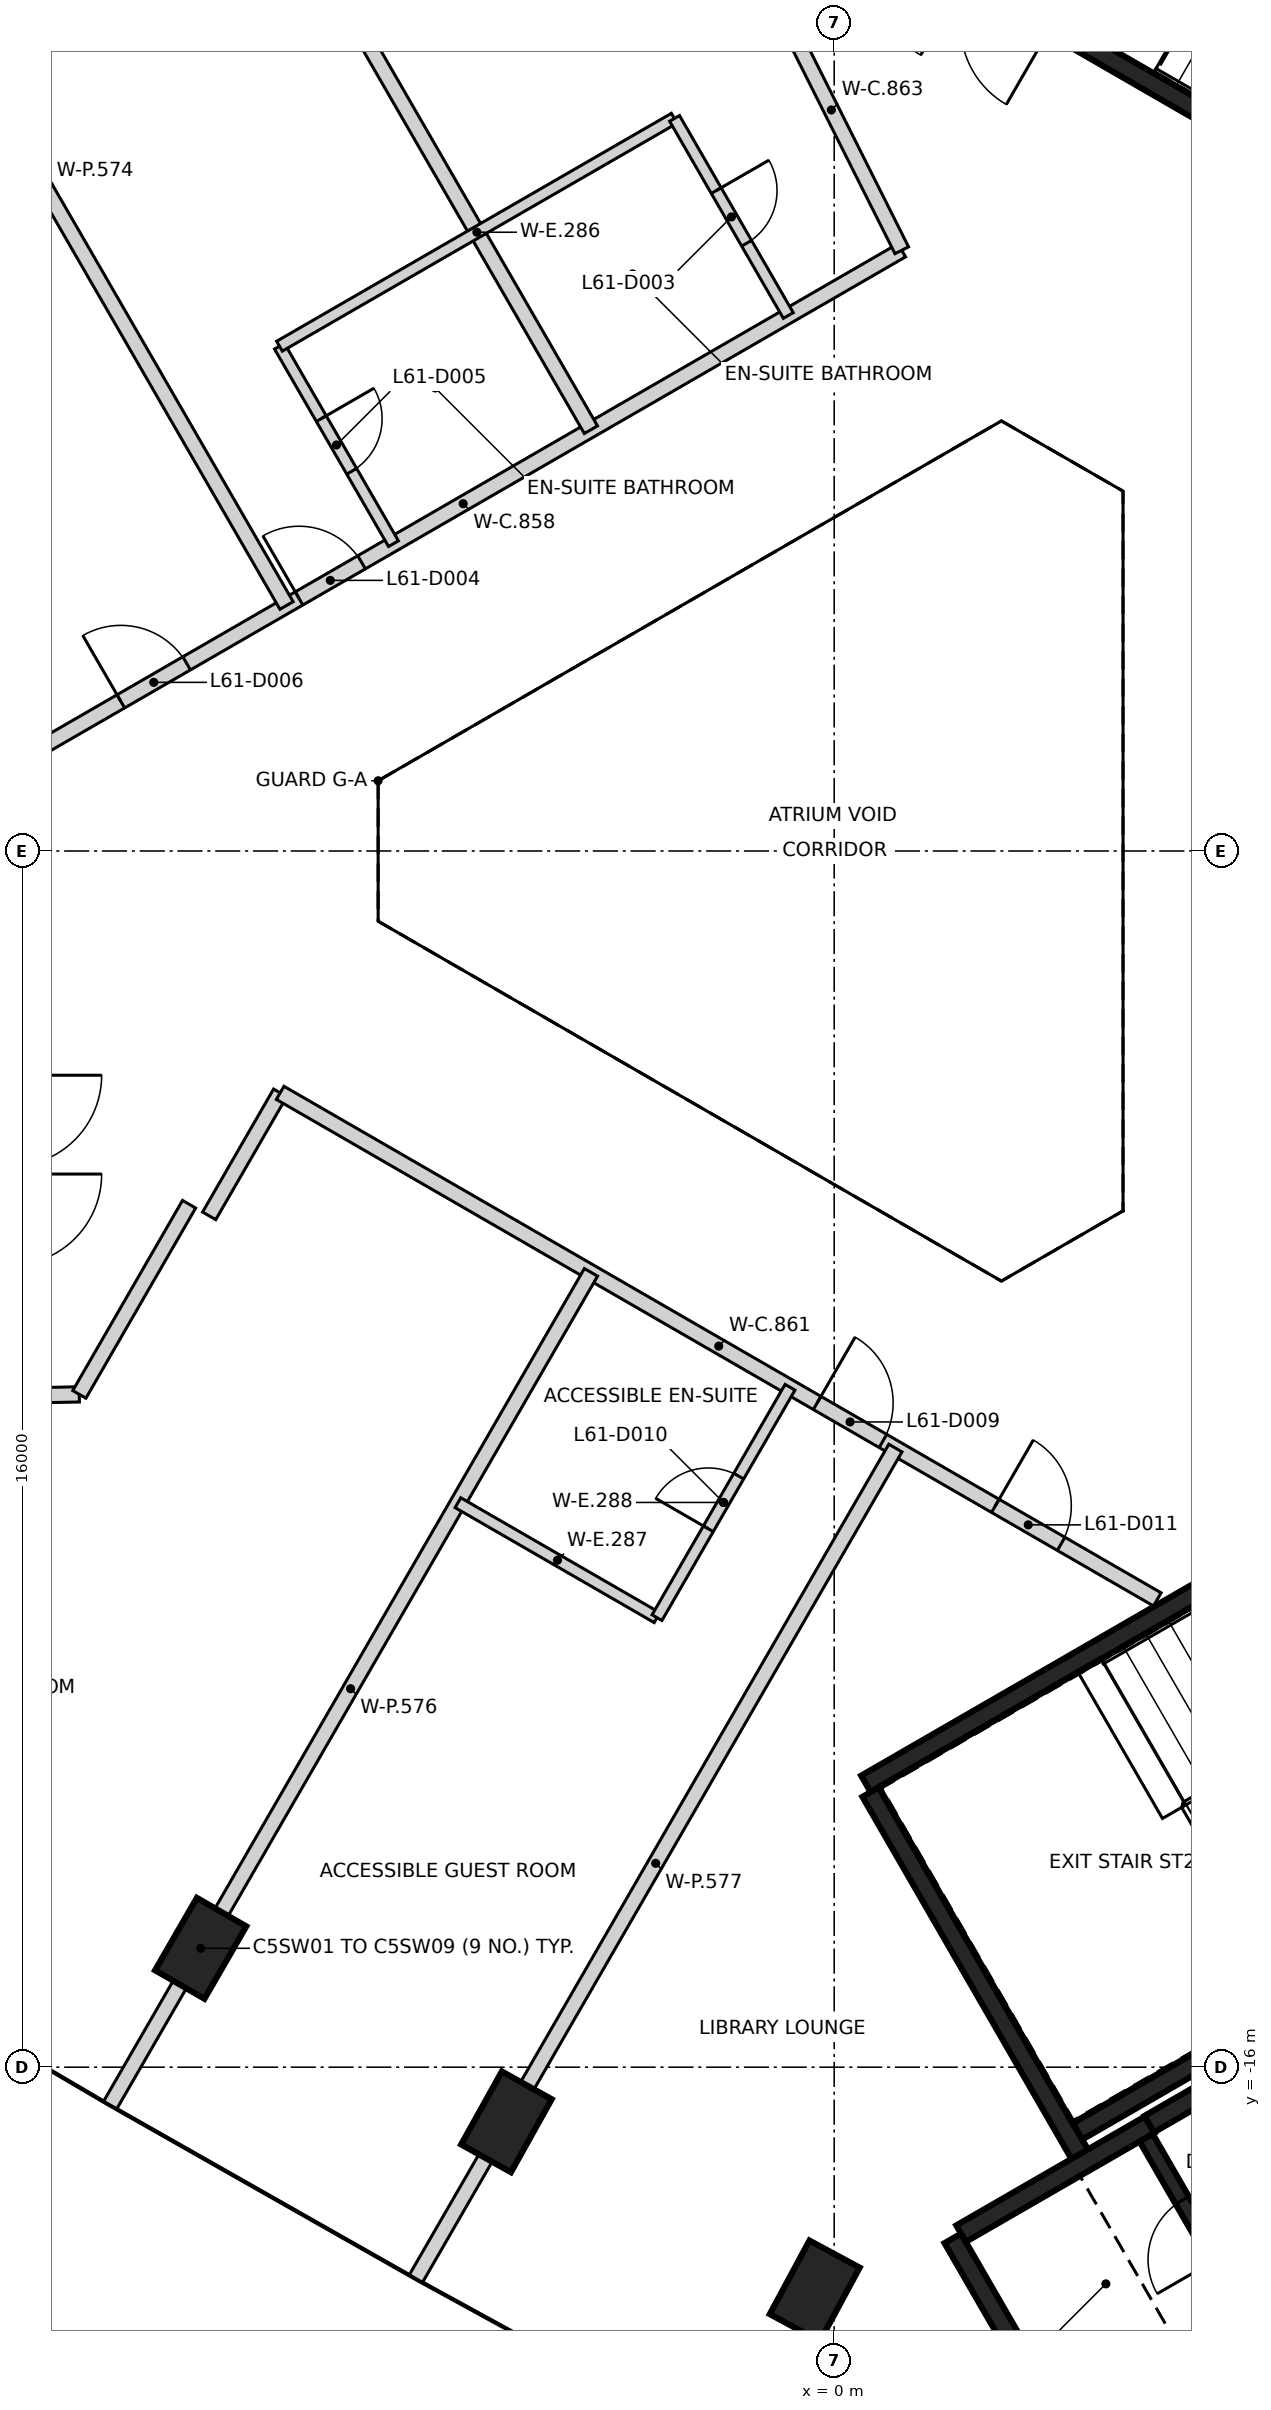
"""IFC4 building model, lengths in metres.
Left out: names, types, materials, properties, quantities, classifications, styles, units other than length and angle.
Written with IfcOpenShell. Run it as: python <this file> out.ifc"""

import sys

from ifc_helpers import new_model, si_unit, direction, frame, frame_2d, origin, origin_2d, place, context, subcontext, project, spatial, rectangle, extrude, element, fill, save


model = new_model("IFC4")
c1 = context("Model", 3, precision=1e-05, world=origin(), true_north=direction((0.0, 1.0)))
c2 = subcontext(c1, "Body", "Model", "MODEL_VIEW")
j1 = project(units=[si_unit("LENGTHUNIT", "METRE"), si_unit("PLANEANGLEUNIT", "RADIAN")], contexts=[c1])
p1 = place(None, origin())
s1 = spatial("IfcSite", under=j1, at=p1, CompositionType="ELEMENT")
p2 = place(p1, origin())
s2 = spatial("IfcBuilding", under=s1, at=p2, CompositionType="ELEMENT")
p3 = place(p2, frame((0.0, 0.0, 243.0)))
s3 = spatial("IfcBuildingStorey", under=s2, at=p3, CompositionType="ELEMENT", Elevation=243.0)
for number, where, z_axis, x_axis in (
    (1, (-8.335, -14.436, -0.35), (0.0, 0.0, 1.0), (0.5, 0.866, 0.0)),
    (2, (-4.312, -16.719, -0.35), (0.0, 0.0, 1.0), (0.487, 0.873, 0.0)),
    (3, (-0.256, -18.943, -0.35), (0.0, 0.0, 1.0), (0.475, 0.88, 0.0)),
):
    element("IfcColumn", number, at=place(p3, frame(where, z_axis=z_axis, x_axis=x_axis)), inside=s3, PredefinedType="COLUMN", context=c2, shape_type="SweptSolid", body=[
        extrude(rectangle(XDim=1.1, YDim=0.75, at=origin_2d()), origin(), (0.0, 0.0, 1.0), 3.6),
    ])
p4 = place(p3, frame((10.42, 6.498, 0.0), z_axis=(0.0, 0.0, 1.0), x_axis=(-0.866021906294, 0.500006057782, 0.0)))
e4 = element("IfcWall", 4, at=p4, inside=s3, PredefinedType="SHEAR", context=c2, shape_type="SweptSolid", body=[
    extrude(rectangle(XDim=11.55, YDim=0.25, at=frame_2d((5.775, 0.0))), origin(), (0.0, 0.0, 1.0), 3.25),
])
p5 = place(p4, frame((10.025, 0.0, 0.0)))
e5 = element("IfcOpeningElement", 5, at=p5, cuts=e4, PredefinedType="OPENING", context=c2, shape_type="SweptSolid", body=[
    extrude(rectangle(XDim=1.2, YDim=2.1, at=frame_2d((0.6, 1.05))), frame((0.0, 0.135, 0.0), z_axis=(0.0, -1.0, 0.0), x_axis=(1.0, 0.0, 0.0)), (0.0, 0.0, 1.0), 0.27),
])
p6 = place(p4, frame((8.725, 0.0, 0.0)))
e6 = element("IfcOpeningElement", 6, at=p6, cuts=e4, PredefinedType="OPENING", context=c2, shape_type="SweptSolid", body=[
    extrude(rectangle(XDim=1.2, YDim=2.1, at=frame_2d((0.6, 1.05))), frame((0.0, 0.135, 0.0), z_axis=(0.0, -1.0, 0.0), x_axis=(1.0, 0.0, 0.0)), (0.0, 0.0, 1.0), 0.27),
])
p7 = place(p3, frame((0.417, -12.273, 0.0), z_axis=(0.0, 0.0, 1.0), x_axis=(0.866021906294, 0.500006057782, 0.0)))
e7 = element("IfcWall", 7, at=p7, inside=s3, PredefinedType="SHEAR", context=c2, shape_type="SweptSolid", body=[
    extrude(rectangle(XDim=11.55, YDim=0.25, at=frame_2d((5.775, 0.0))), origin(), (0.0, 0.0, 1.0), 3.25),
])
p8 = place(p7, frame((10.025, 0.0, 0.0)))
e8 = element("IfcOpeningElement", 8, at=p8, cuts=e7, PredefinedType="OPENING", context=c2, shape_type="SweptSolid", body=[
    extrude(rectangle(XDim=1.2, YDim=2.1, at=frame_2d((0.6, 1.05))), frame((0.0, 0.135, 0.0), z_axis=(0.0, -1.0, 0.0), x_axis=(1.0, 0.0, 0.0)), (0.0, 0.0, 1.0), 0.27),
])
p9 = place(p7, frame((8.725, 0.0, 0.0)))
e9 = element("IfcOpeningElement", 9, at=p9, cuts=e7, PredefinedType="OPENING", context=c2, shape_type="SweptSolid", body=[
    extrude(rectangle(XDim=1.2, YDim=2.1, at=frame_2d((0.6, 1.05))), frame((0.0, 0.135, 0.0), z_axis=(0.0, -1.0, 0.0), x_axis=(1.0, 0.0, 0.0)), (0.0, 0.0, 1.0), 0.27),
])
p10 = place(p3, frame((3.235, -17.153, 0.0), z_axis=(0.0, 0.0, 1.0), x_axis=(-0.500008851346, 0.866020293397, 0.0)))
e10 = element("IfcWall", 10, at=p10, inside=s3, PredefinedType="SHEAR", context=c2, shape_type="SweptSolid", body=[
    extrude(rectangle(XDim=5.51, YDim=0.25, at=frame_2d((2.755, 0.0))), origin(), (0.0, 0.0, 1.0), 3.25),
])
p11 = place(p3, frame((3.217, -21.122, 0.0), z_axis=(0.0, 0.0, 1.0), x_axis=(-0.499998874531, 0.866026053573, 0.0)))
e11 = element("IfcWall", 11, at=p11, inside=s3, PredefinedType="SHEAR", context=c2, shape_type="SweptSolid", body=[
    extrude(rectangle(XDim=3.313, YDim=0.25, at=frame_2d((1.656, 0.0))), origin(), (0.0, 0.0, 1.0), 3.25),
])
p12 = place(p3, frame((1.669, -18.19, 0.0), z_axis=(0.0, 0.0, 1.0), x_axis=(0.866042235819, 0.499970844928, 0.0)))
e12 = element("IfcWall", 12, at=p12, inside=s3, PredefinedType="SHEAR", context=c2, shape_type="SweptSolid", body=[
    extrude(rectangle(XDim=2.865, YDim=0.25, at=frame_2d((1.432, 0.0))), origin(), (0.0, 0.0, 1.0), 3.25),
])
p13 = place(p3, frame((5.675, -19.399, 0.0), z_axis=(0.0, 0.0, 1.0), x_axis=(-0.866026637627, -0.499997862916, 0.0)))
e13 = element("IfcWall", 13, at=p13, inside=s3, PredefinedType="SHEAR", context=c2, shape_type="SweptSolid", body=[
    extrude(rectangle(XDim=2.865, YDim=0.25, at=frame_2d((1.432, 0.0))), origin(), (0.0, 0.0, 1.0), 3.25),
])
p14 = place(p3, frame((5.431, -15.556, 0.0), z_axis=(0.0, 0.0, 1.0), x_axis=(-0.866022940537, -0.500004266446, 0.0)))
e14 = element("IfcWall", 14, at=p14, inside=s3, PredefinedType="SHEAR", context=c2, shape_type="SweptSolid", body=[
    extrude(rectangle(XDim=2.575, YDim=0.25, at=frame_2d((1.287, 0.0))), origin(), (0.0, 0.0, 1.0), 3.25),
])
p15 = place(p3, frame((4.145, -16.749, 0.0), z_axis=(0.0, 0.0, 1.0), x_axis=(0.866038183914, 0.499977863513, 0.0)))
e15 = element("IfcWall", 15, at=p15, inside=s3, PredefinedType="SHEAR", context=c2, shape_type="SweptSolid", body=[
    extrude(rectangle(XDim=1.71, YDim=0.25, at=frame_2d((0.855, 0.0))), origin(), (0.0, 0.0, 1.0), 3.25),
])
p16 = place(p3, frame((5.503, -19.352, 0.0), z_axis=(0.0, 0.0, 1.0), x_axis=(-0.499986818241, 0.866033014143, 0.0)))
e16 = element("IfcWall", 16, at=p16, inside=s3, PredefinedType="SHEAR", context=c2, shape_type="SweptSolid", body=[
    extrude(rectangle(XDim=2.798, YDim=0.2, at=frame_2d((1.399, 0.0))), origin(), (0.0, 0.0, 1.0), 3.25),
])
p17 = place(p16, frame((0.949, 0.0, 0.0)))
e17 = element("IfcOpeningElement", 17, at=p17, cuts=e16, PredefinedType="OPENING", context=c2, shape_type="SweptSolid", body=[
    extrude(rectangle(XDim=0.9, YDim=2.1, at=frame_2d((0.45, 1.05))), frame((0.0, 0.11, 0.0), z_axis=(0.0, -1.0, 0.0), x_axis=(1.0, 0.0, 0.0)), (0.0, 0.0, 1.0), 0.22),
])
p18 = place(p3, frame((-19.149, -7.329, 0.0), z_axis=(0.0, 0.0, 1.0), x_axis=(0.999808990333, 0.019544381503, 0.0)))
e18 = element("IfcWall", 18, at=p18, inside=s3, PredefinedType="PARTITIONING", context=c2, shape_type="SweptSolid", body=[
    extrude(rectangle(XDim=9.219, YDim=0.2, at=frame_2d((4.609, 0.0))), origin(), (0.0, 0.0, 1.0), 3.25),
])
p19 = place(p18, frame((1.649, 0.0, 0.0)))
e19 = element("IfcOpeningElement", 19, at=p19, cuts=e18, PredefinedType="OPENING", context=c2, shape_type="SweptSolid", body=[
    extrude(rectangle(XDim=1.0, YDim=2.1, at=frame_2d((0.5, 1.05))), frame((0.0, 0.11, 0.0), z_axis=(0.0, -1.0, 0.0), x_axis=(1.0, 0.0, 0.0)), (0.0, 0.0, 1.0), 0.22),
])
p20 = place(p18, frame((6.245, 0.0, 0.0)))
e20 = element("IfcOpeningElement", 20, at=p20, cuts=e18, PredefinedType="OPENING", context=c2, shape_type="SweptSolid", body=[
    extrude(rectangle(XDim=1.0, YDim=2.1, at=frame_2d((0.5, 1.05))), frame((0.0, 0.11, 0.0), z_axis=(0.0, -1.0, 0.0), x_axis=(1.0, 0.0, 0.0)), (0.0, 0.0, 1.0), 0.22),
])
p21 = place(p3, frame((-10.652, 1.237, 0.0), z_axis=(0.0, 0.0, 1.0), x_axis=(0.865922902183, 0.50017749597, 0.0)))
e21 = element("IfcWall", 21, at=p21, inside=s3, PredefinedType="PARTITIONING", context=c2, shape_type="SweptSolid", body=[
    extrude(rectangle(XDim=13.328, YDim=0.2, at=frame_2d((6.664, 0.0))), origin(), (0.0, 0.0, 1.0), 3.25),
])
p22 = place(p21, frame((4.171, 0.0, 0.0)))
e22 = element("IfcOpeningElement", 22, at=p22, cuts=e21, PredefinedType="OPENING", context=c2, shape_type="SweptSolid", body=[
    extrude(rectangle(XDim=0.95, YDim=2.1, at=frame_2d((0.475, 1.05))), frame((0.0, 0.11, 0.0), z_axis=(0.0, -1.0, 0.0), x_axis=(1.0, 0.0, 0.0)), (0.0, 0.0, 1.0), 0.22),
])
p23 = place(p21, frame((1.463, 0.0, 0.0)))
e23 = element("IfcOpeningElement", 23, at=p23, cuts=e21, PredefinedType="OPENING", context=c2, shape_type="SweptSolid", body=[
    extrude(rectangle(XDim=1.0, YDim=2.1, at=frame_2d((0.5, 1.05))), frame((0.0, 0.11, 0.0), z_axis=(0.0, -1.0, 0.0), x_axis=(1.0, 0.0, 0.0)), (0.0, 0.0, 1.0), 0.22),
])
p24 = place(p3, frame((-9.931, -7.149, 0.0), z_axis=(0.0, 0.0, 1.0), x_axis=(0.499829760107, 0.866123669525, 0.0)))
e24 = element("IfcWall", 24, at=p24, inside=s3, PredefinedType="PARTITIONING", context=c2, shape_type="SweptSolid", body=[
    extrude(rectangle(XDim=2.889, YDim=0.2, at=frame_2d((1.444, 0.0))), origin(), (0.0, 0.0, 1.0), 3.25),
])
p25 = place(p3, frame((-8.223, -4.8, 0.0), z_axis=(0.0, 0.0, 1.0), x_axis=(0.499835576036, 0.866120313195, 0.0)))
e25 = element("IfcWall", 25, at=p25, inside=s3, PredefinedType="PARTITIONING", context=c2, shape_type="SweptSolid", body=[
    extrude(rectangle(XDim=1.868, YDim=0.2, at=frame_2d((0.934, 0.0))), origin(), (0.0, 0.0, 1.0), 3.25),
])
p26 = place(p3, frame((-7.289, -3.182, 0.0), z_axis=(0.0, 0.0, 1.0), x_axis=(0.865979329032, -0.500079795322, 0.0)))
e26 = element("IfcWall", 26, at=p26, inside=s3, PredefinedType="PARTITIONING", context=c2, shape_type="SweptSolid", body=[
    extrude(rectangle(XDim=13.326, YDim=0.2, at=frame_2d((6.663, 0.0))), origin(), (0.0, 0.0, 1.0), 3.25),
])
p27 = place(p26, frame((8.158, 0.0, 0.0)))
e27 = element("IfcOpeningElement", 27, at=p27, cuts=e26, PredefinedType="OPENING", context=c2, shape_type="SweptSolid", body=[
    extrude(rectangle(XDim=1.0, YDim=2.1, at=frame_2d((0.5, 1.05))), frame((0.0, 0.11, 0.0), z_axis=(0.0, -1.0, 0.0), x_axis=(1.0, 0.0, 0.0)), (0.0, 0.0, 1.0), 0.22),
])
p28 = place(p26, frame((10.865, 0.0, 0.0)))
e28 = element("IfcOpeningElement", 28, at=p28, cuts=e26, PredefinedType="OPENING", context=c2, shape_type="SweptSolid", body=[
    extrude(rectangle(XDim=1.0, YDim=2.1, at=frame_2d((0.5, 1.05))), frame((0.0, 0.11, 0.0), z_axis=(0.0, -1.0, 0.0), x_axis=(1.0, 0.0, 0.0)), (0.0, 0.0, 1.0), 0.22),
])
p29 = place(p3, frame((-0.964, 11.595, 0.0), z_axis=(0.0, 0.0, 1.0), x_axis=(0.448584236569, -0.893740556706, 0.0)))
e29 = element("IfcWall", 29, at=p29, inside=s3, PredefinedType="PARTITIONING", context=c2, shape_type="SweptSolid", body=[
    extrude(rectangle(XDim=4.131, YDim=0.2, at=frame_2d((2.065, 0.0))), origin(), (0.0, 0.0, 1.0), 3.25),
])
p30 = place(p3, frame((-13.513, 14.156, 0.0), z_axis=(0.0, 0.0, 1.0), x_axis=(0.500012240511, -0.866018336607, 0.0)))
e30 = element("IfcWall", 30, at=p30, inside=s3, PredefinedType="PARTITIONING", context=c2, shape_type="SweptSolid", body=[
    extrude(rectangle(XDim=12.616, YDim=0.2, at=frame_2d((6.308, 0.0))), origin(), (0.0, 0.0, 1.0), 3.25),
])
for number, where, z_axis, x_axis in (
    (31, (-9.525, 16.498, 0.0), (0.0, 0.0, 1.0), (0.5, -0.866, 0.0)),
    (32, (-9.525, -16.498, 0.0), (0.0, 0.0, 1.0), (0.5, 0.866, 0.0)),
):
    element("IfcWall", number, at=place(p3, frame(where, z_axis=z_axis, x_axis=x_axis)), inside=s3, PredefinedType="PARTITIONING", context=c2, shape_type="SweptSolid", body=[
        extrude(rectangle(XDim=12.65, YDim=0.2, at=frame_2d((6.325, 0.0))), origin(), (0.0, 0.0, 1.0), 3.25),
    ])
p31 = place(p3, frame((-5.503, -18.781, 0.0), z_axis=(0.0, 0.0, 1.0), x_axis=(0.499968699423, 0.866043474427, 0.0)))
e33 = element("IfcWall", 33, at=p31, inside=s3, PredefinedType="PARTITIONING", context=c2, shape_type="SweptSolid", body=[
    extrude(rectangle(XDim=12.616, YDim=0.2, at=frame_2d((6.308, 0.0))), origin(), (0.0, 0.0, 1.0), 3.25),
])
p32 = place(p3, frame((-7.298, 6.641, 0.0), z_axis=(0.0, 0.0, 1.0), x_axis=(0.499990139034, -0.866031096941, 0.0)))
e34 = element("IfcWall", 34, at=p32, inside=s3, PredefinedType="PARTITIONING", context=c2, shape_type="SweptSolid", body=[
    extrude(rectangle(XDim=3.0, YDim=0.15, at=frame_2d((1.5, 0.0))), origin(), (0.0, 0.0, 1.0), 3.25),
])
p33 = place(p32, frame((1.1, 0.0, 0.0)))
e35 = element("IfcOpeningElement", 35, at=p33, cuts=e34, PredefinedType="OPENING", context=c2, shape_type="SweptSolid", body=[
    extrude(rectangle(XDim=0.8, YDim=2.1, at=frame_2d((0.4, 1.05))), frame((0.0, 0.085, 0.0), z_axis=(0.0, -1.0, 0.0), x_axis=(1.0, 0.0, 0.0)), (0.0, 0.0, 1.0), 0.17),
])
p34 = place(p3, frame((-7.298, 6.641, 0.0), z_axis=(0.0, 0.0, 1.0), x_axis=(0.865999837459, 0.50004427956, 0.0)))
e36 = element("IfcWall", 36, at=p34, inside=s3, PredefinedType="PARTITIONING", context=c2, shape_type="SweptSolid", body=[
    extrude(rectangle(XDim=5.998, YDim=0.15, at=frame_2d((2.999, 0.0))), origin(), (0.0, 0.0, 1.0), 3.25),
])
p35 = place(p3, frame((-4.95, -8.574, 0.0), z_axis=(0.0, 0.0, 1.0), x_axis=(0.866033665757, -0.499985689571, 0.0)))
e37 = element("IfcWall", 37, at=p35, inside=s3, PredefinedType="PARTITIONING", context=c2, shape_type="SweptSolid", body=[
    extrude(rectangle(XDim=3.024, YDim=0.15, at=frame_2d((1.512, 0.0))), origin(), (0.0, 0.0, 1.0), 3.25),
])
p36 = place(p3, frame((-2.331, -10.086, 0.0), z_axis=(0.0, 0.0, 1.0), x_axis=(0.500010275428, 0.866019471182, 0.0)))
e38 = element("IfcWall", 38, at=p36, inside=s3, PredefinedType="PARTITIONING", context=c2, shape_type="SweptSolid", body=[
    extrude(rectangle(XDim=3.5, YDim=0.15, at=frame_2d((1.75, 0.0))), origin(), (0.0, 0.0, 1.0), 3.25),
])
p37 = place(p36, frame((1.35, 0.0, 0.0)))
e39 = element("IfcOpeningElement", 39, at=p37, cuts=e38, PredefinedType="OPENING", context=c2, shape_type="SweptSolid", body=[
    extrude(rectangle(XDim=0.8, YDim=2.1, at=frame_2d((0.4, 1.05))), frame((0.0, 0.085, 0.0), z_axis=(0.0, -1.0, 0.0), x_axis=(1.0, 0.0, 0.0)), (0.0, 0.0, 1.0), 0.17),
])
p38 = place(p3, frame((-2.1, 9.638, 0.0), z_axis=(0.0, 0.0, 1.0), x_axis=(0.499753046638, -0.866167935435, 0.0)))
e40 = element("IfcWall", 40, at=p38, inside=s3, PredefinedType="PARTITIONING", context=c2, shape_type="SweptSolid", body=[
    extrude(rectangle(XDim=2.994, YDim=0.15, at=frame_2d((1.497, 0.0))), origin(), (0.0, 0.0, 1.0), 3.25),
])
p39 = place(p38, frame((1.096, 0.0, 0.0)))
e41 = element("IfcOpeningElement", 41, at=p39, cuts=e40, PredefinedType="OPENING", context=c2, shape_type="SweptSolid", body=[
    extrude(rectangle(XDim=0.8, YDim=2.1, at=frame_2d((0.4, 1.05))), frame((0.0, 0.085, 0.0), z_axis=(0.0, -1.0, 0.0), x_axis=(1.0, 0.0, 0.0)), (0.0, 0.0, 1.0), 0.17),
])
p40 = place(p17, origin())
e42 = element("IfcDoor", 42, at=p40, inside=s3, OperationType="SINGLE_SWING_RIGHT", PredefinedType="DOOR", context=c2, shape_type="SweptSolid", body=[
    extrude(rectangle(XDim=0.9, YDim=2.1, at=frame_2d((0.45, 1.05))), frame((0.0, 0.025, 0.0), z_axis=(0.0, -1.0, 0.0), x_axis=(1.0, 0.0, 0.0)), (0.0, 0.0, 1.0), 0.05),
])
fill(e17, e42)
p41 = place(p39, origin())
e43 = element("IfcDoor", 43, at=p41, inside=s3, OperationType="SINGLE_SWING_LEFT", PredefinedType="DOOR", context=c2, shape_type="SweptSolid", body=[
    extrude(rectangle(XDim=0.8, YDim=2.1, at=frame_2d((0.4, 1.05))), frame((0.0, 0.025, 0.0), z_axis=(0.0, -1.0, 0.0), x_axis=(1.0, 0.0, 0.0)), (0.0, 0.0, 1.0), 0.05),
])
fill(e41, e43)
p42 = place(p22, origin())
e44 = element("IfcDoor", 44, at=p42, inside=s3, OperationType="SINGLE_SWING_LEFT", PredefinedType="DOOR", context=c2, shape_type="SweptSolid", body=[
    extrude(rectangle(XDim=0.95, YDim=2.1, at=frame_2d((0.475, 1.05))), frame((0.0, 0.025, 0.0), z_axis=(0.0, -1.0, 0.0), x_axis=(1.0, 0.0, 0.0)), (0.0, 0.0, 1.0), 0.05),
])
fill(e22, e44)
p43 = place(p33, origin())
e45 = element("IfcDoor", 45, at=p43, inside=s3, OperationType="SINGLE_SWING_LEFT", PredefinedType="DOOR", context=c2, shape_type="SweptSolid", body=[
    extrude(rectangle(XDim=0.8, YDim=2.1, at=frame_2d((0.4, 1.05))), frame((0.0, 0.025, 0.0), z_axis=(0.0, -1.0, 0.0), x_axis=(1.0, 0.0, 0.0)), (0.0, 0.0, 1.0), 0.05),
])
fill(e35, e45)
p44 = place(p23, origin())
e46 = element("IfcDoor", 46, at=p44, inside=s3, OperationType="SINGLE_SWING_LEFT", PredefinedType="DOOR", context=c2, shape_type="SweptSolid", body=[
    extrude(rectangle(XDim=1.0, YDim=2.1, at=frame_2d((0.5, 1.05))), frame((0.0, 0.025, 0.0), z_axis=(0.0, -1.0, 0.0), x_axis=(1.0, 0.0, 0.0)), (0.0, 0.0, 1.0), 0.05),
])
fill(e23, e46)
p45 = place(p27, frame((1.0, 0.0, 0.0), z_axis=(0.0, 0.0, 1.0), x_axis=(-1.0, 0.0, 0.0)))
e47 = element("IfcDoor", 47, at=p45, inside=s3, OperationType="SINGLE_SWING_LEFT", PredefinedType="DOOR", context=c2, shape_type="SweptSolid", body=[
    extrude(rectangle(XDim=1.0, YDim=2.1, at=frame_2d((0.5, 1.05))), frame((0.0, 0.025, 0.0), z_axis=(0.0, -1.0, 0.0), x_axis=(1.0, 0.0, 0.0)), (0.0, 0.0, 1.0), 0.05),
])
fill(e27, e47)
p46 = place(p37, origin())
e48 = element("IfcDoor", 48, at=p46, inside=s3, OperationType="SINGLE_SWING_LEFT", PredefinedType="DOOR", context=c2, shape_type="SweptSolid", body=[
    extrude(rectangle(XDim=0.8, YDim=2.1, at=frame_2d((0.4, 1.05))), frame((0.0, 0.025, 0.0), z_axis=(0.0, -1.0, 0.0), x_axis=(1.0, 0.0, 0.0)), (0.0, 0.0, 1.0), 0.05),
])
fill(e39, e48)
p47 = place(p28, frame((1.0, 0.0, 0.0), z_axis=(0.0, 0.0, 1.0), x_axis=(-1.0, 0.0, 0.0)))
e49 = element("IfcDoor", 49, at=p47, inside=s3, OperationType="SINGLE_SWING_LEFT", PredefinedType="DOOR", context=c2, shape_type="SweptSolid", body=[
    extrude(rectangle(XDim=1.0, YDim=2.1, at=frame_2d((0.5, 1.05))), frame((0.0, 0.025, 0.0), z_axis=(0.0, -1.0, 0.0), x_axis=(1.0, 0.0, 0.0)), (0.0, 0.0, 1.0), 0.05),
])
fill(e28, e49)
save(model, sys.argv[1])
